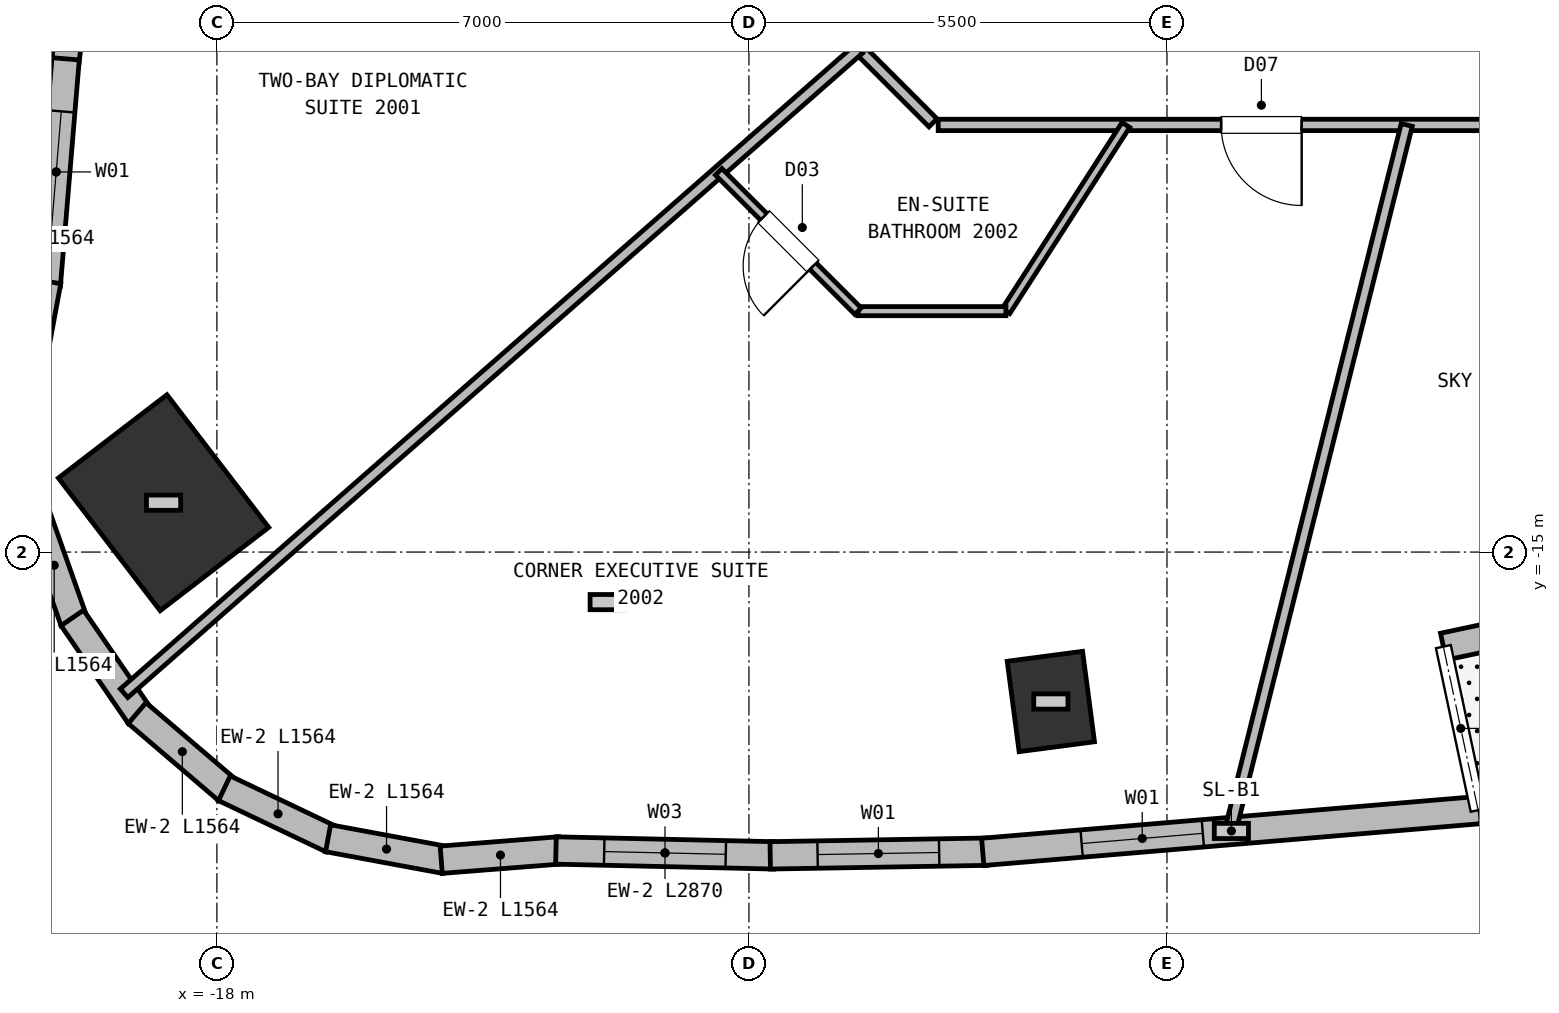
"""IFC4 building model, lengths in metres.
Left out: names, types, materials, properties, quantities, classifications, styles, units other than length and angle.
Written with IfcOpenShell. Run it as: python <this file> out.ifc"""

import sys

from ifc_helpers import new_model, si_unit, direction, frame, frame_2d, origin, origin_2d, place, context, subcontext, project, spatial, rectangle, extrude, element, fill, save


model = new_model("IFC4")
c1 = context("Model", 3, precision=1e-05, world=origin(), true_north=direction((0.0, 1.0)))
c2 = subcontext(c1, "Body", "Model", "MODEL_VIEW")
j1 = project(units=[si_unit("LENGTHUNIT", "METRE"), si_unit("PLANEANGLEUNIT", "RADIAN")], contexts=[c1])
p1 = place(None, origin())
s1 = spatial("IfcSite", under=j1, at=p1, CompositionType="ELEMENT")
p2 = place(p1, origin())
s2 = spatial("IfcBuilding", under=s1, at=p2, CompositionType="ELEMENT")
p3 = place(p2, frame((0.0, 0.0, 71.75)))
s3 = spatial("IfcBuildingStorey", under=s2, at=p3, CompositionType="ELEMENT", Elevation=71.75)
p4 = place(p3, frame((-18.702, -14.351, 0.0), z_axis=(0.0, 0.0, 1.0), x_axis=(0.793353340291, 0.608761429009, 0.0)))
e1 = element("IfcColumn", 1, at=p4, inside=s3, PredefinedType="COLUMN", context=c2, shape_type="SweptSolid", body=[
    extrude(rectangle(XDim=1.8, YDim=2.2, at=origin_2d()), origin(), (0.0, 0.0, 1.0), 3.75),
])
p5 = place(p3, frame((-7.028, -16.966, 0.0), z_axis=(0.0, 0.0, 1.0), x_axis=(0.991444861374, 0.13052619222, 0.0)))
e2 = element("IfcColumn", 2, at=p5, inside=s3, PredefinedType="COLUMN", context=c2, shape_type="SweptSolid", body=[
    extrude(rectangle(XDim=1.0, YDim=1.2, at=origin_2d()), origin(), (0.0, 0.0, 1.0), 3.75),
])
p6 = place(p3, frame((8.309, -14.082, 0.0), z_axis=(0.0, 0.0, 1.0), x_axis=(-0.978145663611, -0.207920804056, 0.0)))
e3 = element("IfcWall", 3, at=p6, inside=s3, PredefinedType="SOLIDWALL", context=c2, shape_type="SweptSolid", body=[
    extrude(rectangle(XDim=10.4, YDim=0.36, at=frame_2d((5.2, 0.0))), origin(), (0.0, 0.0, 1.0), 3.5),
])
p7 = place(p6, frame((3.6, 0.0, 0.0)))
e4 = element("IfcOpeningElement", 4, at=p7, cuts=e3, PredefinedType="OPENING", context=c2, shape_type="SweptSolid", body=[
    extrude(rectangle(XDim=1.65, YDim=2.25, at=frame_2d((0.825, 1.125))), frame((0.0, 0.19, 0.0), z_axis=(0.0, -1.0, 0.0), x_axis=(1.0, 0.0, 0.0)), (0.0, 0.0, 1.0), 0.38),
])
p8 = place(p3, frame((-19.995, -8.56, 0.0), z_axis=(0.0, 0.0, 1.0), x_axis=(0.123740486397, 0.99231461343, 0.0)))
e5 = element("IfcWall", 5, at=p8, inside=s3, PredefinedType="SOLIDWALL", context=c2, shape_type="SweptSolid", body=[
    extrude(rectangle(XDim=2.961, YDim=0.36, at=frame_2d((1.481, 0.0))), origin(), (0.0, 0.0, 1.0), 3.5),
])
p9 = place(p8, frame((0.681, 0.0, 0.72)))
e6 = element("IfcOpeningElement", 6, at=p9, cuts=e5, PredefinedType="OPENING", context=c2, shape_type="SweptSolid", body=[
    extrude(rectangle(XDim=1.6, YDim=1.88, at=frame_2d((0.8, 0.94))), frame((0.0, 0.19, 0.0), z_axis=(0.0, -1.0, 0.0), x_axis=(1.0, 0.0, 0.0)), (0.0, 0.0, 1.0), 0.38),
])
p10 = place(p3, frame((-20.238, -11.487, 0.0), z_axis=(0.0, 0.0, 1.0), x_axis=(0.083126652996, 0.996538990487, 0.0)))
e7 = element("IfcWall", 7, at=p10, inside=s3, PredefinedType="SOLIDWALL", context=c2, shape_type="SweptSolid", body=[
    extrude(rectangle(XDim=2.987, YDim=0.36, at=frame_2d((1.493, 0.0))), origin(), (0.0, 0.0, 1.0), 3.5),
])
p11 = place(p10, frame((0.694, 0.0, 0.72)))
e8 = element("IfcOpeningElement", 8, at=p11, cuts=e7, PredefinedType="OPENING", context=c2, shape_type="SweptSolid", body=[
    extrude(rectangle(XDim=1.6, YDim=1.88, at=frame_2d((0.8, 0.94))), frame((0.0, 0.19, 0.0), z_axis=(0.0, -1.0, 0.0), x_axis=(1.0, 0.0, 0.0)), (0.0, 0.0, 1.0), 0.38),
])
for number, where, z_axis, x_axis in (
    (9, (-20.517, -12.975, 0.0), (0.0, 0.0, 1.0), (0.182, 0.983, 0.0)),
    (10, (-19.88, -15.911, 0.0), (0.0, 0.0, 1.0), (-0.334, 0.943, 0.0)),
):
    element("IfcWall", number, at=place(p3, frame(where, z_axis=z_axis, x_axis=x_axis)), inside=s3, PredefinedType="SOLIDWALL", context=c2, shape_type="SweptSolid", body=[
        extrude(rectangle(XDim=1.564, YDim=0.36, at=frame_2d((0.782, 0.0))), origin(), (0.0, 0.0, 1.0), 3.5),
    ])
for number, where, z_axis, x_axis in (
    (11, (-19.016, -17.156, 0.0), (0.0, 0.0, 1.0), (-0.566, 0.824, 0.0)),
    (12, (-17.86, -18.135, 0.0), (0.0, 0.0, 1.0), (-0.76, 0.649, 0.0)),
):
    element("IfcWall", number, at=place(p3, frame(where, z_axis=z_axis, x_axis=x_axis)), inside=s3, PredefinedType="SOLIDWALL", context=c2, shape_type="SweptSolid", body=[
        extrude(rectangle(XDim=1.564, YDim=0.36, at=frame_2d((0.782, 0.0))), origin(), (0.0, 0.0, 1.0), 3.5),
    ])
for number, where, z_axis, x_axis in (
    (13, (-16.49, -18.781, 0.0), (0.0, 0.0, 1.0), (-0.903, 0.431, 0.0)),
    (14, (-14.999, -19.051, 0.0), (0.0, 0.0, 1.0), (-0.983, 0.182, 0.0)),
    (15, (-13.489, -18.925, 0.0), (0.0, 0.0, 1.0), (-0.997, -0.079, 0.0)),
):
    element("IfcWall", number, at=place(p3, frame(where, z_axis=z_axis, x_axis=x_axis)), inside=s3, PredefinedType="SOLIDWALL", context=c2, shape_type="SweptSolid", body=[
        extrude(rectangle(XDim=1.564, YDim=0.36, at=frame_2d((0.782, 0.0))), origin(), (0.0, 0.0, 1.0), 3.5),
    ])
p12 = place(p3, frame((-10.67, -18.991, 0.0), z_axis=(0.0, 0.0, 1.0), x_axis=(-0.999751621908, 0.02228664383, 0.0)))
e16 = element("IfcWall", 16, at=p12, inside=s3, PredefinedType="SOLIDWALL", context=c2, shape_type="SweptSolid", body=[
    extrude(rectangle(XDim=2.87, YDim=0.36, at=frame_2d((1.435, 0.0))), origin(), (0.0, 0.0, 1.0), 3.5),
])
p13 = place(p12, frame((0.635, 0.0, 0.72)))
e17 = element("IfcOpeningElement", 17, at=p13, cuts=e16, PredefinedType="OPENING", context=c2, shape_type="SweptSolid", body=[
    extrude(rectangle(XDim=1.6, YDim=1.88, at=frame_2d((0.8, 0.94))), frame((0.0, 0.19, 0.0), z_axis=(0.0, -1.0, 0.0), x_axis=(1.0, 0.0, 0.0)), (0.0, 0.0, 1.0), 0.38),
])
p14 = place(p3, frame((-7.874, -18.942, 0.0), z_axis=(0.0, 0.0, 1.0), x_axis=(-0.999857230365, -0.016897304142, 0.0)))
e18 = element("IfcWall", 18, at=p14, inside=s3, PredefinedType="SOLIDWALL", context=c2, shape_type="SweptSolid", body=[
    extrude(rectangle(XDim=2.846, YDim=0.36, at=frame_2d((1.423, 0.0))), origin(), (0.0, 0.0, 1.0), 3.5),
])
p15 = place(p14, frame((0.623, 0.0, 0.72)))
e19 = element("IfcOpeningElement", 19, at=p15, cuts=e18, PredefinedType="OPENING", context=c2, shape_type="SweptSolid", body=[
    extrude(rectangle(XDim=1.6, YDim=1.88, at=frame_2d((0.8, 0.94))), frame((0.0, 0.19, 0.0), z_axis=(0.0, -1.0, 0.0), x_axis=(1.0, 0.0, 0.0)), (0.0, 0.0, 1.0), 0.38),
])
p16 = place(p3, frame((-1.381, -18.394, 0.0), z_axis=(0.0, 0.0, 1.0), x_axis=(-0.996472288139, -0.083922458089, 0.0)))
e20 = element("IfcWall", 20, at=p16, inside=s3, PredefinedType="SOLIDWALL", context=c2, shape_type="SweptSolid", body=[
    extrude(rectangle(XDim=6.566, YDim=0.36, at=frame_2d((3.283, 0.0))), origin(), (0.0, 0.0, 1.0), 3.5),
])
p17 = place(p16, frame((3.66, 0.0, 0.72)))
e21 = element("IfcOpeningElement", 21, at=p17, cuts=e20, PredefinedType="OPENING", context=c2, shape_type="SweptSolid", body=[
    extrude(rectangle(XDim=1.6, YDim=1.88, at=frame_2d((0.8, 0.94))), frame((0.0, 0.19, 0.0), z_axis=(0.0, -1.0, 0.0), x_axis=(1.0, 0.0, 0.0)), (0.0, 0.0, 1.0), 0.38),
])
p18 = place(p3, frame((8.51, -9.38, 0.0), z_axis=(0.0, 0.0, 1.0), x_axis=(-1.0, 0.0, 0.0)))
e22 = element("IfcWall", 22, at=p18, inside=s3, PredefinedType="PARTITIONING", context=c2, shape_type="SweptSolid", body=[
    extrude(rectangle(XDim=17.02, YDim=0.15, at=frame_2d((8.51, 0.0))), origin(), (0.0, 0.0, 1.0), 3.5),
])
p19 = place(p18, frame((5.815, 0.0, 0.0)))
e23 = element("IfcOpeningElement", 23, at=p19, cuts=e22, PredefinedType="OPENING", context=c2, shape_type="SweptSolid", body=[
    extrude(rectangle(XDim=1.0, YDim=2.15, at=frame_2d((0.5, 1.075))), frame((0.0, 0.085, 0.0), z_axis=(0.0, -1.0, 0.0), x_axis=(1.0, 0.0, 0.0)), (0.0, 0.0, 1.0), 0.17),
])
p20 = place(p18, frame((12.238, 0.0, 0.0)))
e24 = element("IfcOpeningElement", 24, at=p20, cuts=e22, PredefinedType="OPENING", context=c2, shape_type="SweptSolid", body=[
    extrude(rectangle(XDim=1.06, YDim=2.15, at=frame_2d((0.53, 1.075))), frame((0.0, 0.085, 0.0), z_axis=(0.0, -1.0, 0.0), x_axis=(1.0, 0.0, 0.0)), (0.0, 0.0, 1.0), 0.17),
])
p21 = place(p3, frame((-8.578, -9.352, 0.0), z_axis=(0.0, 0.0, 1.0), x_axis=(-0.707067066127, 0.707146494016, 0.0)))
e25 = element("IfcWall", 25, at=p21, inside=s3, PredefinedType="PARTITIONING", context=c2, shape_type="SweptSolid", body=[
    extrude(rectangle(XDim=3.074, YDim=0.15, at=frame_2d((1.537, 0.0))), origin(), (0.0, 0.0, 1.0), 3.5),
])
p22 = place(p3, frame((-9.552, -8.377, 0.0), z_axis=(0.0, 0.0, 1.0), x_axis=(-0.751837697968, -0.659348220529, 0.0)))
e26 = element("IfcWall", 26, at=p22, inside=s3, PredefinedType="PARTITIONING", context=c2, shape_type="SweptSolid", body=[
    extrude(rectangle(XDim=12.86, YDim=0.15, at=frame_2d((6.43, 0.0))), origin(), (0.0, 0.0, 1.0), 3.5),
])
p23 = place(p3, frame((-7.619, -11.83, 0.0), z_axis=(0.0, 0.0, 1.0), x_axis=(0.541367176674, 0.840786286769, 0.0)))
e27 = element("IfcWall", 27, at=p23, inside=s3, PredefinedType="PARTITIONING", context=c2, shape_type="SweptSolid", body=[
    extrude(rectangle(XDim=2.914, YDim=0.12, at=frame_2d((1.457, 0.0))), origin(), (0.0, 0.0, 1.0), 3.5),
])
p24 = place(p3, frame((-7.619, -11.83, 0.0), z_axis=(0.0, 0.0, 1.0), x_axis=(-1.0, 0.0, 0.0)))
e28 = element("IfcWall", 28, at=p24, inside=s3, PredefinedType="PARTITIONING", context=c2, shape_type="SweptSolid", body=[
    extrude(rectangle(XDim=1.946, YDim=0.12, at=frame_2d((0.973, 0.0))), origin(), (0.0, 0.0, 1.0), 3.5),
])
p25 = place(p3, frame((-9.565, -11.83, 0.0), z_axis=(0.0, 0.0, 1.0), x_axis=(-0.707106781187, 0.707106781187, 0.0)))
e29 = element("IfcWall", 29, at=p25, inside=s3, PredefinedType="PARTITIONING", context=c2, shape_type="SweptSolid", body=[
    extrude(rectangle(XDim=2.593, YDim=0.12, at=frame_2d((1.297, 0.0))), origin(), (0.0, 0.0, 1.0), 3.5),
])
p26 = place(p25, frame((0.837, 0.0, 0.0)))
e30 = element("IfcOpeningElement", 30, at=p26, cuts=e29, PredefinedType="OPENING", context=c2, shape_type="SweptSolid", body=[
    extrude(rectangle(XDim=0.92, YDim=2.1, at=frame_2d((0.46, 1.05))), frame((0.0, 0.07, 0.0), z_axis=(0.0, -1.0, 0.0), x_axis=(1.0, 0.0, 0.0)), (0.0, 0.0, 1.0), 0.14),
])
p27 = place(p3, frame((-2.345, -9.38, 0.0), z_axis=(0.0, 0.0, 1.0), x_axis=(-0.242559617753, -0.970136501651, 0.0)))
e31 = element("IfcWall", 31, at=p27, inside=s3, PredefinedType="PARTITIONING", context=c2, shape_type="SweptSolid", body=[
    extrude(rectangle(XDim=9.577, YDim=0.15, at=frame_2d((4.789, 0.0))), origin(), (0.0, 0.0, 1.0), 3.5),
])
p28 = place(p11, origin())
e32 = element("IfcWindow", 32, at=p28, inside=s3, PartitioningType="SINGLE_PANEL", PredefinedType="WINDOW", context=c2, shape_type="SweptSolid", body=[
    extrude(rectangle(XDim=1.6, YDim=1.88, at=frame_2d((0.8, 0.94))), frame((0.0, 0.03, 0.0), z_axis=(0.0, -1.0, 0.0), x_axis=(1.0, 0.0, 0.0)), (0.0, 0.0, 1.0), 0.06),
])
fill(e8, e32)
p29 = place(p13, origin())
e33 = element("IfcWindow", 33, at=p29, inside=s3, PartitioningType="SINGLE_PANEL", PredefinedType="WINDOW", context=c2, shape_type="SweptSolid", body=[
    extrude(rectangle(XDim=1.6, YDim=1.88, at=frame_2d((0.8, 0.94))), frame((0.0, 0.03, 0.0), z_axis=(0.0, -1.0, 0.0), x_axis=(1.0, 0.0, 0.0)), (0.0, 0.0, 1.0), 0.06),
])
fill(e17, e33)
p30 = place(p15, origin())
e34 = element("IfcWindow", 34, at=p30, inside=s3, PartitioningType="SINGLE_PANEL", PredefinedType="WINDOW", context=c2, shape_type="SweptSolid", body=[
    extrude(rectangle(XDim=1.6, YDim=1.88, at=frame_2d((0.8, 0.94))), frame((0.0, 0.03, 0.0), z_axis=(0.0, -1.0, 0.0), x_axis=(1.0, 0.0, 0.0)), (0.0, 0.0, 1.0), 0.06),
])
fill(e19, e34)
p31 = place(p17, origin())
e35 = element("IfcWindow", 35, at=p31, inside=s3, PartitioningType="SINGLE_PANEL", PredefinedType="WINDOW", context=c2, shape_type="SweptSolid", body=[
    extrude(rectangle(XDim=1.6, YDim=1.88, at=frame_2d((0.8, 0.94))), frame((0.0, 0.03, 0.0), z_axis=(0.0, -1.0, 0.0), x_axis=(1.0, 0.0, 0.0)), (0.0, 0.0, 1.0), 0.06),
])
fill(e21, e35)
p32 = place(p26, origin())
e36 = element("IfcDoor", 36, at=p32, inside=s3, OperationType="SINGLE_SWING_LEFT", PredefinedType="DOOR", context=c2, shape_type="SweptSolid", body=[
    extrude(rectangle(XDim=0.92, YDim=2.1, at=frame_2d((0.46, 1.05))), frame((0.0, 0.025, 0.0), z_axis=(0.0, -1.0, 0.0), x_axis=(1.0, 0.0, 0.0)), (0.0, 0.0, 1.0), 0.05),
])
fill(e30, e36)
p33 = place(p20, origin())
e37 = element("IfcDoor", 37, at=p33, inside=s3, OperationType="SINGLE_SWING_LEFT", PredefinedType="DOOR", context=c2, shape_type="SweptSolid", body=[
    extrude(rectangle(XDim=1.06, YDim=2.15, at=frame_2d((0.53, 1.075))), frame((0.0, 0.025, 0.0), z_axis=(0.0, -1.0, 0.0), x_axis=(1.0, 0.0, 0.0)), (0.0, 0.0, 1.0), 0.05),
])
fill(e24, e37)
save(model, sys.argv[1])
